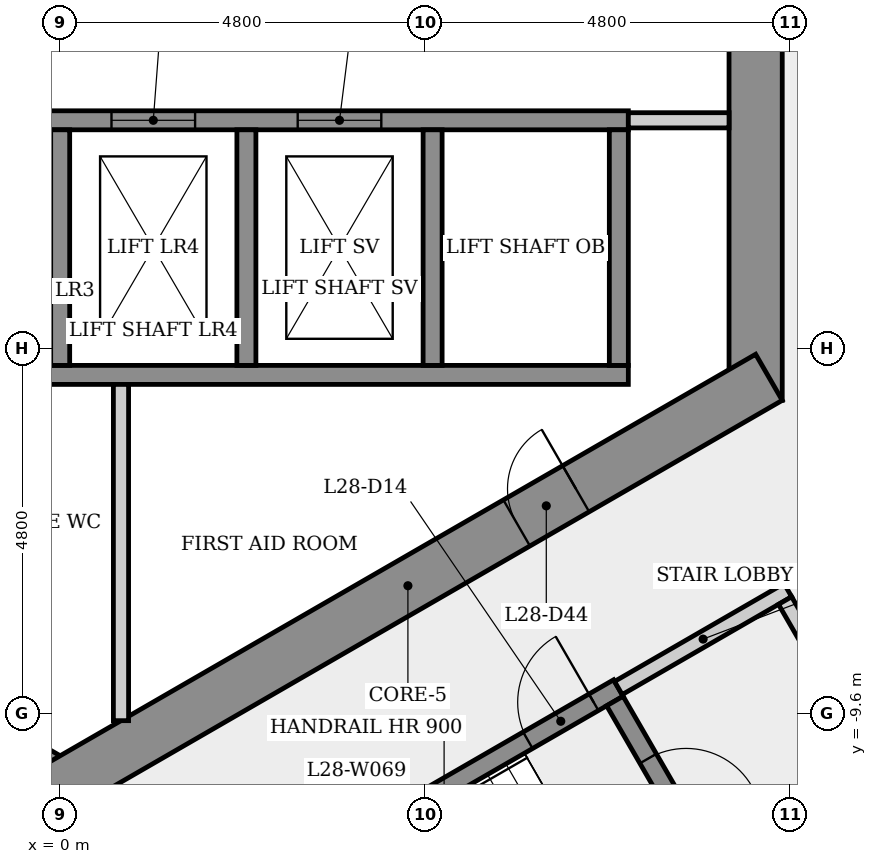
"""IFC4 building model, lengths in metres.
Left out: names, types, materials, properties, quantities, classifications, styles, units other than length and angle.
Written with IfcOpenShell. Run it as: python <this file> out.ifc"""

import sys

from ifc_helpers import new_model, si_unit, direction, frame, frame_2d, origin, place, context, subcontext, project, spatial, rectangle, extrude, element, fill, save


model = new_model("IFC4")
c1 = context("Model", 3, precision=1e-05, world=origin(), true_north=direction((0.0, 1.0)))
c2 = subcontext(c1, "Body", "Model", "MODEL_VIEW")
j1 = project(units=[si_unit("LENGTHUNIT", "METRE"), si_unit("PLANEANGLEUNIT", "RADIAN")], contexts=[c1])
p1 = place(None, origin())
s1 = spatial("IfcSite", under=j1, at=p1, CompositionType="ELEMENT")
p2 = place(p1, origin())
s2 = spatial("IfcBuilding", under=s1, at=p2, CompositionType="ELEMENT")
p3 = place(p2, frame((0.0, 0.0, 106.9)))
s3 = spatial("IfcBuildingStorey", under=s2, at=p3, CompositionType="ELEMENT", Elevation=106.9)
p4 = place(p3, frame((9.15, -5.485, 0.0), z_axis=(0.0, 0.0, 1.0), x_axis=(0.0, 1.0, 0.0)))
e1 = element("IfcWall", 1, at=p4, inside=s3, PredefinedType="SHEAR", context=c2, shape_type="SweptSolid", body=[
    extrude(rectangle(XDim=10.97, YDim=0.7, at=frame_2d((5.485, 0.0))), origin(), (0.0, 0.0, 1.0), 3.4),
])
p5 = place(p4, frame((4.685, 0.0, 0.0)))
e2 = element("IfcOpeningElement", 2, at=p5, cuts=e1, PredefinedType="OPENING", context=c2, shape_type="SweptSolid", body=[
    extrude(rectangle(XDim=1.6, YDim=2.1, at=frame_2d((0.8, 1.05))), frame((0.0, 0.36, 0.0), z_axis=(0.0, -1.0, 0.0), x_axis=(1.0, 0.0, 0.0)), (0.0, 0.0, 1.0), 0.72),
])
p6 = place(p3, frame((-9.325, -5.182, 0.0), z_axis=(0.0, 0.0, 1.0), x_axis=(0.866023993627, -0.500002442456, 0.0)))
e3 = element("IfcWall", 3, at=p6, inside=s3, PredefinedType="SHEAR", context=c2, shape_type="SweptSolid", body=[
    extrude(rectangle(XDim=10.97, YDim=0.7, at=frame_2d((5.485, 0.0))), origin(), (0.0, 0.0, 1.0), 3.4),
])
p7 = place(p6, frame((2.239, 0.0, 0.0)))
e4 = element("IfcOpeningElement", 4, at=p7, cuts=e3, PredefinedType="OPENING", context=c2, shape_type="SweptSolid", body=[
    extrude(rectangle(XDim=0.9, YDim=2.1, at=frame_2d((0.45, 1.05))), frame((0.0, 0.36, 0.0), z_axis=(0.0, -1.0, 0.0), x_axis=(1.0, 0.0, 0.0)), (0.0, 0.0, 1.0), 0.72),
])
p8 = place(p6, frame((8.96, 0.0, 0.0)))
e5 = element("IfcOpeningElement", 5, at=p8, cuts=e3, PredefinedType="OPENING", context=c2, shape_type="SweptSolid", body=[
    extrude(rectangle(XDim=0.9, YDim=2.1, at=frame_2d((0.45, 1.05))), frame((0.0, 0.36, 0.0), z_axis=(0.0, -1.0, 0.0), x_axis=(1.0, 0.0, 0.0)), (0.0, 0.0, 1.0), 0.72),
])
p9 = place(p3, frame((-0.175, -10.667, 0.0), z_axis=(0.0, 0.0, 1.0), x_axis=(0.866023993627, 0.500002442456, 0.0)))
e6 = element("IfcWall", 6, at=p9, inside=s3, PredefinedType="SHEAR", context=c2, shape_type="SweptSolid", body=[
    extrude(rectangle(XDim=10.97, YDim=0.7, at=frame_2d((5.485, 0.0))), origin(), (0.0, 0.0, 1.0), 3.4),
])
p10 = place(p9, frame((7.137, 0.0, 0.0)))
e7 = element("IfcOpeningElement", 7, at=p10, cuts=e6, PredefinedType="OPENING", context=c2, shape_type="SweptSolid", body=[
    extrude(rectangle(XDim=0.9, YDim=2.1, at=frame_2d((0.45, 1.05))), frame((0.0, 0.36, 0.0), z_axis=(0.0, -1.0, 0.0), x_axis=(1.0, 0.0, 0.0)), (0.0, 0.0, 1.0), 0.72),
])
p11 = place(p3, frame((-7.225, -5.15, 0.0), z_axis=(0.0, 0.0, 1.0), x_axis=(1.0, 0.0, 0.0)))
e8 = element("IfcWall", 8, at=p11, inside=s3, PredefinedType="SHEAR", context=c2, shape_type="SweptSolid", body=[
    extrude(rectangle(XDim=14.7, YDim=0.25, at=frame_2d((7.35, 0.0))), origin(), (0.0, 0.0, 1.0), 3.05),
])
p12 = place(p3, frame((-7.225, -1.8, 0.0), z_axis=(0.0, 0.0, 1.0), x_axis=(1.0, 0.0, 0.0)))
e9 = element("IfcWall", 9, at=p12, inside=s3, PredefinedType="SHEAR", context=c2, shape_type="SweptSolid", body=[
    extrude(rectangle(XDim=14.7, YDim=0.25, at=frame_2d((7.35, 0.0))), origin(), (0.0, 0.0, 1.0), 3.05),
])
p13 = place(p12, frame((0.597, 0.0, 0.0)))
e10 = element("IfcOpeningElement", 10, at=p13, cuts=e9, PredefinedType="OPENING", context=c2, shape_type="SweptSolid", body=[
    extrude(rectangle(XDim=1.1, YDim=2.1, at=frame_2d((0.55, 1.05))), frame((0.0, 0.135, 0.0), z_axis=(0.0, -1.0, 0.0), x_axis=(1.0, 0.0, 0.0)), (0.0, 0.0, 1.0), 0.27),
])
p14 = place(p12, frame((3.0, 0.0, 0.0)))
e11 = element("IfcOpeningElement", 11, at=p14, cuts=e9, PredefinedType="OPENING", context=c2, shape_type="SweptSolid", body=[
    extrude(rectangle(XDim=1.1, YDim=2.1, at=frame_2d((0.55, 1.05))), frame((0.0, 0.135, 0.0), z_axis=(0.0, -1.0, 0.0), x_axis=(1.0, 0.0, 0.0)), (0.0, 0.0, 1.0), 0.27),
])
p15 = place(p12, frame((5.45, 0.0, 0.0)))
e12 = element("IfcOpeningElement", 12, at=p15, cuts=e9, PredefinedType="OPENING", context=c2, shape_type="SweptSolid", body=[
    extrude(rectangle(XDim=1.1, YDim=2.1, at=frame_2d((0.55, 1.05))), frame((0.0, 0.135, 0.0), z_axis=(0.0, -1.0, 0.0), x_axis=(1.0, 0.0, 0.0)), (0.0, 0.0, 1.0), 0.27),
])
p16 = place(p12, frame((7.9, 0.0, 0.0)))
e13 = element("IfcOpeningElement", 13, at=p16, cuts=e9, PredefinedType="OPENING", context=c2, shape_type="SweptSolid", body=[
    extrude(rectangle(XDim=1.1, YDim=2.1, at=frame_2d((0.55, 1.05))), frame((0.0, 0.135, 0.0), z_axis=(0.0, -1.0, 0.0), x_axis=(1.0, 0.0, 0.0)), (0.0, 0.0, 1.0), 0.27),
])
p17 = place(p12, frame((10.35, 0.0, 0.0)))
e14 = element("IfcOpeningElement", 14, at=p17, cuts=e9, PredefinedType="OPENING", context=c2, shape_type="SweptSolid", body=[
    extrude(rectangle(XDim=1.1, YDim=2.1, at=frame_2d((0.55, 1.05))), frame((0.0, 0.135, 0.0), z_axis=(0.0, -1.0, 0.0), x_axis=(1.0, 0.0, 0.0)), (0.0, 0.0, 1.0), 0.27),
])
p18 = place(p3, frame((0.0, -1.925, 0.0), z_axis=(0.0, 0.0, 1.0), x_axis=(0.0, -1.0, 0.0)))
e15 = element("IfcWall", 15, at=p18, inside=s3, PredefinedType="SHEAR", context=c2, shape_type="SweptSolid", body=[
    extrude(rectangle(XDim=3.1, YDim=0.25, at=frame_2d((1.55, 0.0))), origin(), (0.0, 0.0, 1.0), 3.4),
])
p19 = place(p3, frame((0.8, -5.275, 0.0), z_axis=(0.0, 0.0, 1.0), x_axis=(0.0, -1.0, 0.0)))
e16 = element("IfcWall", 16, at=p19, inside=s3, PredefinedType="PARTITIONING", context=c2, shape_type="SweptSolid", body=[
    extrude(rectangle(XDim=4.425, YDim=0.2, at=frame_2d((2.212, 0.0))), origin(), (0.0, 0.0, 1.0), 3.05),
])
p20 = place(p3, frame((1.585, -12.595, 0.0), z_axis=(0.0, 0.0, 1.0), x_axis=(0.866036417653, 0.499980922934, 0.0)))
e17 = element("IfcWall", 17, at=p20, inside=s3, PredefinedType="SHEAR", context=c2, shape_type="SweptSolid", body=[
    extrude(rectangle(XDim=6.65, YDim=0.25, at=frame_2d((3.325, 0.0))), origin(), (0.0, 0.0, 1.0), 3.05),
])
p21 = place(p20, frame((5.275, 0.0, 0.0)))
e18 = element("IfcOpeningElement", 18, at=p21, cuts=e17, PredefinedType="OPENING", context=c2, shape_type="SweptSolid", body=[
    extrude(rectangle(XDim=1.0, YDim=2.1, at=frame_2d((0.5, 1.05))), frame((0.0, 0.135, 0.0), z_axis=(0.0, -1.0, 0.0), x_axis=(1.0, 0.0, 0.0)), (0.0, 0.0, 1.0), 0.27),
])
for number, where, z_axis, x_axis in (
    (19, (2.45, -1.925, 0.0), (0.0, 0.0, 1.0), (0.0, -1.0, 0.0)),
    (20, (4.9, -1.925, 0.0), (0.0, 0.0, 1.0), (0.0, -1.0, 0.0)),
):
    element("IfcWall", number, at=place(p3, frame(where, z_axis=z_axis, x_axis=x_axis)), inside=s3, PredefinedType="SHEAR", context=c2, shape_type="SweptSolid", body=[
        extrude(rectangle(XDim=3.1, YDim=0.25, at=frame_2d((1.55, 0.0))), origin(), (0.0, 0.0, 1.0), 3.4),
    ])
p22 = place(p3, frame((7.298, -9.441, 0.0), z_axis=(0.0, 0.0, 1.0), x_axis=(0.500034990121, -0.866005201286, 0.0)))
e21 = element("IfcWall", 21, at=p22, inside=s3, PredefinedType="SHEAR", context=c2, shape_type="SweptSolid", body=[
    extrude(rectangle(XDim=2.75, YDim=0.25, at=frame_2d((1.375, 0.0))), origin(), (0.0, 0.0, 1.0), 3.05),
])
p23 = place(p22, frame((0.875, 0.0, 0.0)))
e22 = element("IfcOpeningElement", 22, at=p23, cuts=e21, PredefinedType="OPENING", context=c2, shape_type="SweptSolid", body=[
    extrude(rectangle(XDim=1.0, YDim=2.1, at=frame_2d((0.5, 1.05))), frame((0.0, 0.135, 0.0), z_axis=(0.0, -1.0, 0.0), x_axis=(1.0, 0.0, 0.0)), (0.0, 0.0, 1.0), 0.27),
])
p24 = place(p3, frame((7.344, -9.27, 0.0), z_axis=(0.0, 0.0, 1.0), x_axis=(0.866005588531, 0.500034319456, 0.0)))
e23 = element("IfcWall", 23, at=p24, inside=s3, PredefinedType="PARTITIONING", context=c2, shape_type="SweptSolid", body=[
    extrude(rectangle(XDim=2.575, YDim=0.2, at=frame_2d((1.288, 0.0))), origin(), (0.0, 0.0, 1.0), 3.05),
])
p25 = place(p3, frame((7.35, -1.925, 0.0), z_axis=(0.0, 0.0, 1.0), x_axis=(0.0, -1.0, 0.0)))
e24 = element("IfcWall", 24, at=p25, inside=s3, PredefinedType="SHEAR", context=c2, shape_type="SweptSolid", body=[
    extrude(rectangle(XDim=3.1, YDim=0.25, at=frame_2d((1.55, 0.0))), origin(), (0.0, 0.0, 1.0), 3.4),
])
p26 = place(p3, frame((8.8, -1.8, 0.0), z_axis=(0.0, 0.0, 1.0), x_axis=(-1.0, 0.0, 0.0)))
e25 = element("IfcWall", 25, at=p26, inside=s3, PredefinedType="PARTITIONING", context=c2, shape_type="SweptSolid", body=[
    extrude(rectangle(XDim=1.325, YDim=0.2, at=frame_2d((0.663, 0.0))), origin(), (0.0, 0.0, 1.0), 3.05),
])
p27 = place(p3, frame((9.537, -8.119, 0.0), z_axis=(0.0, 0.0, 1.0), x_axis=(0.499990139034, -0.866031096941, 0.0)))
e26 = element("IfcWall", 26, at=p27, inside=s3, PredefinedType="PARTITIONING", context=c2, shape_type="SweptSolid", body=[
    extrude(rectangle(XDim=3.0, YDim=0.2, at=frame_2d((1.5, 0.0))), origin(), (0.0, 0.0, 1.0), 3.05),
])
p28 = place(p27, frame((0.935, 0.0, 0.0)))
e27 = element("IfcOpeningElement", 27, at=p28, cuts=e26, PredefinedType="OPENING", context=c2, shape_type="SweptSolid", body=[
    extrude(rectangle(XDim=1.0, YDim=2.1, at=frame_2d((0.5, 1.05))), frame((0.0, 0.11, 0.0), z_axis=(0.0, -1.0, 0.0), x_axis=(1.0, 0.0, 0.0)), (0.0, 0.0, 1.0), 0.22),
])
p29 = place(p16, origin())
e28 = element("IfcDoor", 28, at=p29, inside=s3, OperationType="SLIDING_TO_LEFT", PredefinedType="DOOR", context=c2, shape_type="SweptSolid", body=[
    extrude(rectangle(XDim=1.1, YDim=2.1, at=frame_2d((0.55, 1.05))), frame((0.0, 0.025, 0.0), z_axis=(0.0, -1.0, 0.0), x_axis=(1.0, 0.0, 0.0)), (0.0, 0.0, 1.0), 0.05),
])
fill(e13, e28)
p30 = place(p17, origin())
e29 = element("IfcDoor", 29, at=p30, inside=s3, OperationType="SLIDING_TO_LEFT", PredefinedType="DOOR", context=c2, shape_type="SweptSolid", body=[
    extrude(rectangle(XDim=1.1, YDim=2.1, at=frame_2d((0.55, 1.05))), frame((0.0, 0.025, 0.0), z_axis=(0.0, -1.0, 0.0), x_axis=(1.0, 0.0, 0.0)), (0.0, 0.0, 1.0), 0.05),
])
fill(e14, e29)
p31 = place(p21, origin())
e30 = element("IfcDoor", 30, at=p31, inside=s3, OperationType="SINGLE_SWING_RIGHT", PredefinedType="DOOR", context=c2, shape_type="SweptSolid", body=[
    extrude(rectangle(XDim=1.0, YDim=2.1, at=frame_2d((0.5, 1.05))), frame((0.0, 0.025, 0.0), z_axis=(0.0, -1.0, 0.0), x_axis=(1.0, 0.0, 0.0)), (0.0, 0.0, 1.0), 0.05),
])
fill(e18, e30)
p32 = place(p23, origin())
e31 = element("IfcDoor", 31, at=p32, inside=s3, OperationType="SINGLE_SWING_RIGHT", PredefinedType="DOOR", context=c2, shape_type="SweptSolid", body=[
    extrude(rectangle(XDim=1.0, YDim=2.1, at=frame_2d((0.5, 1.05))), frame((0.0, 0.025, 0.0), z_axis=(0.0, -1.0, 0.0), x_axis=(1.0, 0.0, 0.0)), (0.0, 0.0, 1.0), 0.05),
])
fill(e22, e31)
p33 = place(p10, origin())
e32 = element("IfcDoor", 32, at=p33, inside=s3, OperationType="SINGLE_SWING_RIGHT", PredefinedType="DOOR", context=c2, shape_type="SweptSolid", body=[
    extrude(rectangle(XDim=0.9, YDim=2.1, at=frame_2d((0.45, 1.05))), frame((0.0, 0.025, 0.0), z_axis=(0.0, -1.0, 0.0), x_axis=(1.0, 0.0, 0.0)), (0.0, 0.0, 1.0), 0.05),
])
fill(e7, e32)
save(model, sys.argv[1])
